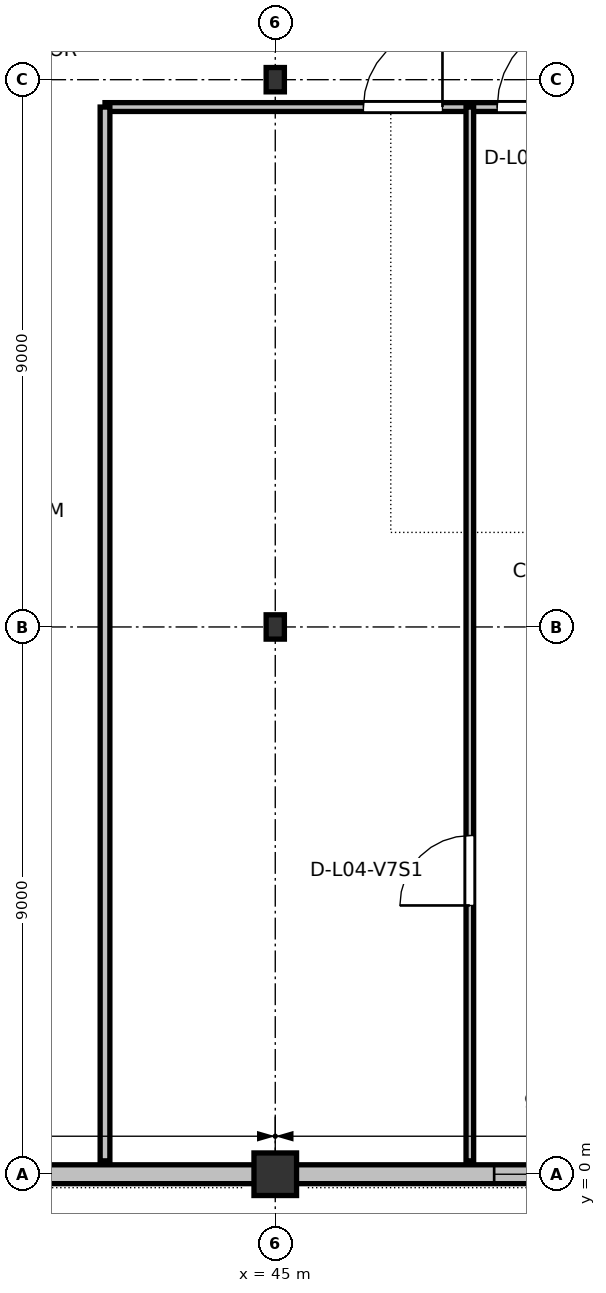
"""IFC4 building model, lengths in metres.
Left out: names, types, materials, properties, quantities, classifications, styles, units other than length and angle.
Written with IfcOpenShell. Run it as: python <this file> out.ifc"""

import sys

from ifc_helpers import new_model, si_unit, direction, frame, frame_2d, origin, origin_2d, place, context, subcontext, project, spatial, rectangle, i_section, extrude, element, fill, save


model = new_model("IFC4")
c1 = context("Model", 3, precision=1e-05, world=origin(), true_north=direction((0.0, 1.0)))
c2 = subcontext(c1, "Body", "Model", "MODEL_VIEW")
j1 = project(units=[si_unit("LENGTHUNIT", "METRE"), si_unit("PLANEANGLEUNIT", "RADIAN")], contexts=[c1])
p1 = place(None, origin())
s1 = spatial("IfcSite", under=j1, at=p1, CompositionType="ELEMENT")
p2 = place(p1, origin())
s2 = spatial("IfcBuilding", under=s1, at=p2, CompositionType="ELEMENT")
p3 = place(p2, frame((0.0, 0.0, 19.2)))
s3 = spatial("IfcBuildingStorey", under=s2, at=p3, CompositionType="ELEMENT", Elevation=19.2)
p4 = place(p3, frame((45.0, 0.0, 0.0), z_axis=(0.0, 0.0, 1.0), x_axis=(1.0, 0.0, 0.0)))
e1 = element("IfcColumn", 1, at=p4, inside=s3, PredefinedType="COLUMN", context=c2, shape_type="SweptSolid", body=[
    extrude(rectangle(XDim=0.7, YDim=0.7, at=origin_2d()), origin(), (0.0, 0.0, 1.0), 4.2),
])
for number, where, z_axis, x_axis in (
    (2, (45.0, 9.0, 0.0), (0.0, 0.0, 1.0), (1.0, 0.0, 0.0)),
    (3, (45.0, 18.0, 0.0), (0.0, 0.0, 1.0), (1.0, 0.0, 0.0)),
):
    element("IfcColumn", number, at=place(p3, frame(where, z_axis=z_axis, x_axis=x_axis)), inside=s3, PredefinedType="COLUMN", context=c2, shape_type="SweptSolid", body=[
        extrude(i_section(OverallWidth=0.3, OverallDepth=0.4, WebThickness=0.013, FlangeThickness=0.024, at=origin_2d()), origin(), (0.0, 0.0, 1.0), 4.2),
    ])
p5 = place(p3, frame((36.335, 0.0, 0.0), z_axis=(0.0, 0.0, 1.0), x_axis=(1.0, 0.0, 0.0)))
e4 = element("IfcWall", 4, at=p5, inside=s3, PredefinedType="STANDARD", context=c2, shape_type="SweptSolid", body=[
    extrude(rectangle(XDim=8.33, YDim=0.31, at=frame_2d((4.165, 0.0))), origin(), (0.0, 0.0, 1.0), 3.635),
])
p6 = place(p5, frame((0.75, 0.0, 0.9)))
e5 = element("IfcOpeningElement", 5, at=p6, cuts=e4, PredefinedType="OPENING", context=c2, shape_type="SweptSolid", body=[
    extrude(rectangle(XDim=1.8, YDim=2.1, at=frame_2d((0.9, 1.05))), frame((0.0, 0.165, 0.0), z_axis=(0.0, -1.0, 0.0), x_axis=(1.0, 0.0, 0.0)), (0.0, 0.0, 1.0), 0.33),
])
p7 = place(p3, frame((45.335, 0.0, 0.0), z_axis=(0.0, 0.0, 1.0), x_axis=(1.0, 0.0, 0.0)))
e6 = element("IfcWall", 6, at=p7, inside=s3, PredefinedType="STANDARD", context=c2, shape_type="SweptSolid", body=[
    extrude(rectangle(XDim=8.33, YDim=0.31, at=frame_2d((4.165, 0.0))), origin(), (0.0, 0.0, 1.0), 3.635),
])
p8 = place(p7, frame((3.265, 0.0, 0.9)))
e7 = element("IfcOpeningElement", 7, at=p8, cuts=e6, PredefinedType="OPENING", context=c2, shape_type="SweptSolid", body=[
    extrude(rectangle(XDim=1.8, YDim=2.1, at=frame_2d((0.9, 1.05))), frame((0.0, 0.165, 0.0), z_axis=(0.0, -1.0, 0.0), x_axis=(1.0, 0.0, 0.0)), (0.0, 0.0, 1.0), 0.33),
])
p9 = place(p3, frame((42.2, 17.55, 0.0), z_axis=(0.0, 0.0, 1.0), x_axis=(1.0, 0.0, 0.0)))
e8 = element("IfcWall", 8, at=p9, inside=s3, PredefinedType="PARTITIONING", context=c2, shape_type="SweptSolid", body=[
    extrude(rectangle(XDim=23.6, YDim=0.145, at=frame_2d((11.8, 0.0))), origin(), (0.0, 0.0, 1.0), 3.96),
])
p10 = place(p9, frame((4.25, 0.0, 0.0)))
e9 = element("IfcOpeningElement", 9, at=p10, cuts=e8, PredefinedType="OPENING", context=c2, shape_type="SweptSolid", body=[
    extrude(rectangle(XDim=1.3, YDim=2.18, at=frame_2d((0.65, 1.09))), frame((0.0, 0.083, 0.0), z_axis=(0.0, -1.0, 0.0), x_axis=(1.0, 0.0, 0.0)), (0.0, 0.0, 1.0), 0.165),
])
p11 = place(p9, frame((6.45, 0.0, 0.0)))
e10 = element("IfcOpeningElement", 10, at=p11, cuts=e8, PredefinedType="OPENING", context=c2, shape_type="SweptSolid", body=[
    extrude(rectangle(XDim=1.45, YDim=2.22, at=frame_2d((0.725, 1.11))), frame((0.0, 0.083, 0.0), z_axis=(0.0, -1.0, 0.0), x_axis=(1.0, 0.0, 0.0)), (0.0, 0.0, 1.0), 0.165),
])
p12 = place(p9, frame((15.85, 0.0, 0.0)))
e11 = element("IfcOpeningElement", 11, at=p12, cuts=e8, PredefinedType="OPENING", context=c2, shape_type="SweptSolid", body=[
    extrude(rectangle(XDim=1.55, YDim=2.24, at=frame_2d((0.775, 1.12))), frame((0.0, 0.083, 0.0), z_axis=(0.0, -1.0, 0.0), x_axis=(1.0, 0.0, 0.0)), (0.0, 0.0, 1.0), 0.165),
])
p13 = place(p3, frame((42.2, 0.22, 0.0), z_axis=(0.0, 0.0, 1.0), x_axis=(0.0, 1.0, 0.0)))
e12 = element("IfcWall", 12, at=p13, inside=s3, PredefinedType="PARTITIONING", context=c2, shape_type="SweptSolid", body=[
    extrude(rectangle(XDim=17.33, YDim=0.16, at=frame_2d((8.665, 0.0))), origin(), (0.0, 0.0, 1.0), 3.96),
])
p14 = place(p3, frame((48.2, 0.22, 0.0), z_axis=(0.0, 0.0, 1.0), x_axis=(0.0, 1.0, 0.0)))
e13 = element("IfcWall", 13, at=p14, inside=s3, PredefinedType="PARTITIONING", context=c2, shape_type="SweptSolid", body=[
    extrude(rectangle(XDim=17.33, YDim=0.125, at=frame_2d((8.665, 0.0))), origin(), (0.0, 0.0, 1.0), 3.96),
])
p15 = place(p14, frame((4.2, 0.0, 0.0)))
e14 = element("IfcOpeningElement", 14, at=p15, cuts=e13, PredefinedType="OPENING", context=c2, shape_type="SweptSolid", body=[
    extrude(rectangle(XDim=1.15, YDim=2.15, at=frame_2d((0.575, 1.075))), frame((0.0, 0.073, 0.0), z_axis=(0.0, -1.0, 0.0), x_axis=(1.0, 0.0, 0.0)), (0.0, 0.0, 1.0), 0.145),
])
p16 = place(p8, origin())
e15 = element("IfcWindow", 15, at=p16, inside=s3, PartitioningType="SINGLE_PANEL", PredefinedType="WINDOW", context=c2, shape_type="SweptSolid", body=[
    extrude(rectangle(XDim=1.8, YDim=2.1, at=frame_2d((0.9, 1.05))), frame((0.0, 0.03, 0.0), z_axis=(0.0, -1.0, 0.0), x_axis=(1.0, 0.0, 0.0)), (0.0, 0.0, 1.0), 0.06),
])
fill(e7, e15)
p17 = place(p10, origin())
e16 = element("IfcDoor", 16, at=p17, inside=s3, OperationType="SINGLE_SWING_RIGHT", PredefinedType="DOOR", context=c2, shape_type="SweptSolid", body=[
    extrude(rectangle(XDim=1.3, YDim=2.18, at=frame_2d((0.65, 1.09))), frame((0.0, 0.025, 0.0), z_axis=(0.0, -1.0, 0.0), x_axis=(1.0, 0.0, 0.0)), (0.0, 0.0, 1.0), 0.05),
])
fill(e9, e16)
p18 = place(p15, origin())
e17 = element("IfcDoor", 17, at=p18, inside=s3, OperationType="SINGLE_SWING_LEFT", PredefinedType="DOOR", context=c2, shape_type="SweptSolid", body=[
    extrude(rectangle(XDim=1.15, YDim=2.15, at=frame_2d((0.575, 1.075))), frame((0.0, 0.025, 0.0), z_axis=(0.0, -1.0, 0.0), x_axis=(1.0, 0.0, 0.0)), (0.0, 0.0, 1.0), 0.05),
])
fill(e14, e17)
p19 = place(p11, origin())
e18 = element("IfcDoor", 18, at=p19, inside=s3, OperationType="SINGLE_SWING_RIGHT", PredefinedType="DOOR", context=c2, shape_type="SweptSolid", body=[
    extrude(rectangle(XDim=1.45, YDim=2.22, at=frame_2d((0.725, 1.11))), frame((0.0, 0.025, 0.0), z_axis=(0.0, -1.0, 0.0), x_axis=(1.0, 0.0, 0.0)), (0.0, 0.0, 1.0), 0.05),
])
fill(e10, e18)
save(model, sys.argv[1])
